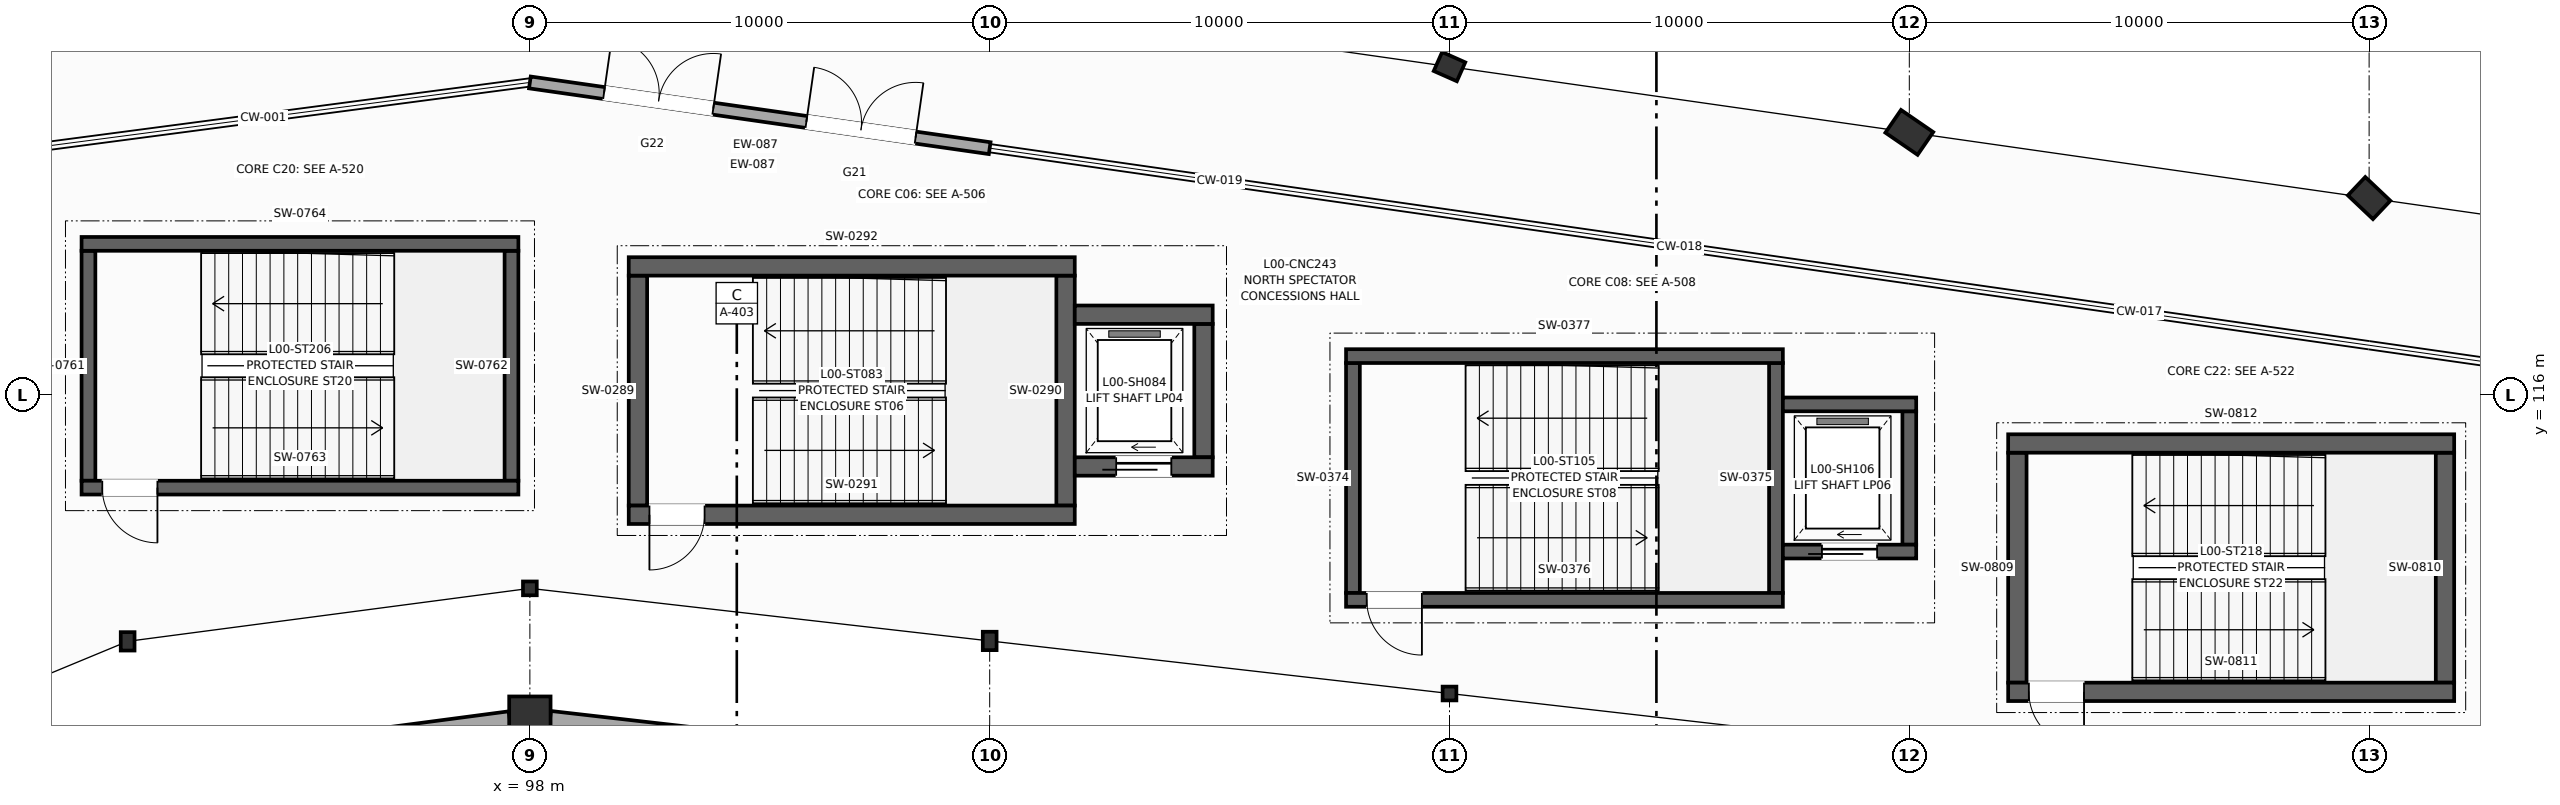
"""IFC4 building model, lengths in metres.
Left out: names, types, materials, properties, quantities, classifications, styles, units other than length and angle.
Written with IfcOpenShell. Run it as: python <this file> out.ifc"""

import sys

from ifc_helpers import new_model, si_unit, direction, frame, frame_2d, origin, origin_2d, place, context, subcontext, project, spatial, rectangle, i_section, extrude, element, fill, save


model = new_model("IFC4")
c1 = context("Model", 3, precision=1e-05, world=origin(), true_north=direction((0.0, 1.0)))
c2 = subcontext(c1, "Body", "Model", "MODEL_VIEW")
j1 = project(units=[si_unit("LENGTHUNIT", "METRE"), si_unit("PLANEANGLEUNIT", "RADIAN")], contexts=[c1])
p1 = place(None, origin())
s1 = spatial("IfcSite", under=j1, at=p1, CompositionType="ELEMENT")
p2 = place(p1, origin())
s2 = spatial("IfcBuilding", under=s1, at=p2, CompositionType="ELEMENT")
p3 = place(p2, origin())
s3 = spatial("IfcBuildingStorey", under=s2, at=p3, CompositionType="ELEMENT", Elevation=0.0)
p4 = place(p3, frame((98.0, 109.0, 0.0), z_axis=(0.0, 0.0, 1.0), x_axis=(0.0, 1.0, 0.0)))
e1 = element("IfcColumn", 1, at=p4, inside=s3, PredefinedType="COLUMN", context=c2, shape_type="SweptSolid", body=[
    extrude(rectangle(XDim=0.9, YDim=0.9, at=origin_2d()), origin(), (0.0, 0.0, 1.0), 4.5),
])
p5 = place(p3, frame((98.0, 111.8, 0.0), z_axis=(0.0, 0.0, 1.0), x_axis=(1.0, 0.0, 0.0)))
e2 = element("IfcColumn", 2, at=p5, inside=s3, PredefinedType="COLUMN", context=c2, shape_type="SweptSolid", body=[
    extrude(i_section(OverallWidth=0.3, OverallDepth=0.3, WebThickness=0.011, FlangeThickness=0.019, at=origin_2d()), origin(), (0.0, 0.0, 1.0), 4.5),
])
p6 = place(p3, frame((89.252, 110.648, 0.0), z_axis=(0.0, 0.0, 1.0), x_axis=(1.0, 0.0, 0.0)))
e3 = element("IfcColumn", 3, at=p6, inside=s3, PredefinedType="COLUMN", context=c2, shape_type="SweptSolid", body=[
    extrude(i_section(OverallWidth=0.3, OverallDepth=0.4, WebThickness=0.013, FlangeThickness=0.024, at=origin_2d()), origin(), (0.0, 0.0, 1.0), 4.5),
])
p7 = place(p3, frame((118.0, 109.514, 0.0), z_axis=(0.0, 0.0, 1.0), x_axis=(1.0, 0.0, 0.0)))
e4 = element("IfcColumn", 4, at=p7, inside=s3, PredefinedType="COLUMN", context=c2, shape_type="SweptSolid", body=[
    extrude(i_section(OverallWidth=0.3, OverallDepth=0.3, WebThickness=0.011, FlangeThickness=0.019, at=origin_2d()), origin(), (0.0, 0.0, 1.0), 4.5),
])
p8 = place(p3, frame((108.0, 110.657, 0.0), z_axis=(0.0, 0.0, 1.0), x_axis=(1.0, 0.0, 0.0)))
e5 = element("IfcColumn", 5, at=p8, inside=s3, PredefinedType="COLUMN", context=c2, shape_type="SweptSolid", body=[
    extrude(i_section(OverallWidth=0.3, OverallDepth=0.4, WebThickness=0.013, FlangeThickness=0.024, at=origin_2d()), origin(), (0.0, 0.0, 1.0), 4.5),
])
p9 = place(p3, frame((138.0, 120.286, 0.0), z_axis=(0.0, 0.0, 1.0), x_axis=(0.687087510804, 0.726574670971, 0.0)))
e6 = element("IfcColumn", 6, at=p9, inside=s3, PredefinedType="PILASTER", context=c2, shape_type="SweptSolid", body=[
    extrude(rectangle(XDim=0.75, YDim=0.55, at=origin_2d()), origin(), (0.0, 0.0, 1.0), 4.5),
])
p10 = place(p3, frame((128.0, 121.714, 0.0), z_axis=(0.0, 0.0, 1.0), x_axis=(0.566406236925, 0.824126188622, 0.0)))
e7 = element("IfcColumn", 7, at=p10, inside=s3, PredefinedType="PILASTER", context=c2, shape_type="SweptSolid", body=[
    extrude(rectangle(XDim=0.85, YDim=0.6, at=origin_2d()), origin(), (0.0, 0.0, 1.0), 4.5),
])
p11 = place(p3, frame((118.0, 123.143, 0.0), z_axis=(0.0, 0.0, 1.0), x_axis=(0.40514158678, 0.914253955234, 0.0)))
e8 = element("IfcColumn", 8, at=p11, inside=s3, PredefinedType="PILASTER", context=c2, shape_type="SweptSolid", body=[
    extrude(rectangle(XDim=0.55, YDim=0.45, at=origin_2d()), origin(), (0.0, 0.0, 1.0), 4.5),
])
p12 = place(p3, frame((108.0, 121.371, 0.0), z_axis=(0.0, 0.0, 1.0), x_axis=(-0.989944175879, 0.141458575718, 0.0)))
e9 = element("IfcWall", 9, at=p12, inside=s3, PredefinedType="SOLIDWALL", context=c2, shape_type="SweptSolid", body=[
    extrude(rectangle(XDim=10.102, YDim=0.26, at=frame_2d((5.051, 0.0))), origin(), (0.0, 0.0, 1.0), 3.68),
])
p13 = place(p12, frame((1.628, 0.0, 0.0)))
e10 = element("IfcOpeningElement", 10, at=p13, cuts=e9, PredefinedType="OPENING", context=c2, shape_type="SweptSolid", body=[
    extrude(rectangle(XDim=2.4, YDim=2.5, at=frame_2d((1.2, 1.25))), frame((0.0, 0.14, 0.0), z_axis=(0.0, -1.0, 0.0), x_axis=(1.0, 0.0, 0.0)), (0.0, 0.0, 1.0), 0.28),
])
p14 = place(p12, frame((6.073, 0.0, 0.0)))
e11 = element("IfcOpeningElement", 11, at=p14, cuts=e9, PredefinedType="OPENING", context=c2, shape_type="SweptSolid", body=[
    extrude(rectangle(XDim=2.4, YDim=2.5, at=frame_2d((1.2, 1.25))), frame((0.0, 0.14, 0.0), z_axis=(0.0, -1.0, 0.0), x_axis=(1.0, 0.0, 0.0)), (0.0, 0.0, 1.0), 0.28),
])
p15 = place(p3, frame((97.564, 108.943, 0.0), z_axis=(0.0, 0.0, 1.0), x_axis=(-0.991432160885, -0.130622625772, 0.0)))
e12 = element("IfcWall", 12, at=p15, inside=s3, PredefinedType="SOLIDWALL", context=c2, shape_type="SweptSolid", body=[
    extrude(rectangle(XDim=7.213, YDim=0.37, at=frame_2d((3.606, 0.0))), origin(), (0.0, 0.0, 1.0), 3.3),
])
p16 = place(p3, frame((107.563, 107.907, 0.0), z_axis=(0.0, 0.0, 1.0), x_axis=(-0.993532672656, 0.113546591161, 0.0)))
e13 = element("IfcWall", 13, at=p16, inside=s3, PredefinedType="SOLIDWALL", context=c2, shape_type="SweptSolid", body=[
    extrude(rectangle(XDim=9.185, YDim=0.37, at=frame_2d((4.593, 0.0))), origin(), (0.0, 0.0, 1.0), 3.3),
])
for number, where, z_axis, x_axis in (
    (14, (100.35, 113.6, 0.0), (0.0, 0.0, 1.0), (0.0, 1.0, 0.0)),
    (15, (109.65, 113.6, 0.0), (0.0, 0.0, 1.0), (0.0, 1.0, 0.0)),
):
    element("IfcWall", number, at=place(p3, frame(where, z_axis=z_axis, x_axis=x_axis)), inside=s3, PredefinedType="SHEAR", context=c2, shape_type="SweptSolid", body=[
        extrude(rectangle(XDim=5.0, YDim=0.4, at=frame_2d((2.5, 0.0))), origin(), (0.0, 0.0, 1.0), 4.225),
    ])
p17 = place(p3, frame((100.15, 113.4, 0.0), z_axis=(0.0, 0.0, 1.0), x_axis=(1.0, 0.0, 0.0)))
e16 = element("IfcWall", 16, at=p17, inside=s3, PredefinedType="SHEAR", context=c2, shape_type="SweptSolid", body=[
    extrude(rectangle(XDim=9.7, YDim=0.4, at=frame_2d((4.85, 0.0))), origin(), (0.0, 0.0, 1.0), 4.225),
])
p18 = place(p17, frame((0.45, 0.0, 0.0)))
e17 = element("IfcOpeningElement", 17, at=p18, cuts=e16, PredefinedType="OPENING", context=c2, shape_type="SweptSolid", body=[
    extrude(rectangle(XDim=1.2, YDim=2.2, at=frame_2d((0.6, 1.1))), frame((0.0, 0.21, 0.0), z_axis=(0.0, -1.0, 0.0), x_axis=(1.0, 0.0, 0.0)), (0.0, 0.0, 1.0), 0.42),
])
p19 = place(p3, frame((100.15, 118.8, 0.0), z_axis=(0.0, 0.0, 1.0), x_axis=(1.0, 0.0, 0.0)))
e18 = element("IfcWall", 18, at=p19, inside=s3, PredefinedType="SHEAR", context=c2, shape_type="SweptSolid", body=[
    extrude(rectangle(XDim=9.7, YDim=0.4, at=frame_2d((4.85, 0.0))), origin(), (0.0, 0.0, 1.0), 4.225),
])
p20 = place(p3, frame((112.65, 114.65, 0.0), z_axis=(0.0, 0.0, 1.0), x_axis=(0.0, 1.0, 0.0)))
e19 = element("IfcWall", 19, at=p20, inside=s3, PredefinedType="SHEAR", context=c2, shape_type="SweptSolid", body=[
    extrude(rectangle(XDim=2.9, YDim=0.4, at=frame_2d((1.45, 0.0))), origin(), (0.0, 0.0, 1.0), 4.225),
])
p21 = place(p3, frame((109.85, 114.45, 0.0), z_axis=(0.0, 0.0, 1.0), x_axis=(1.0, 0.0, 0.0)))
e20 = element("IfcWall", 20, at=p21, inside=s3, PredefinedType="SHEAR", context=c2, shape_type="SweptSolid", body=[
    extrude(rectangle(XDim=3.0, YDim=0.4, at=frame_2d((1.5, 0.0))), origin(), (0.0, 0.0, 1.0), 4.225),
])
p22 = place(p21, frame((0.9, 0.0, 0.0)))
e21 = element("IfcOpeningElement", 21, at=p22, cuts=e20, PredefinedType="OPENING", context=c2, shape_type="SweptSolid", body=[
    extrude(rectangle(XDim=1.2, YDim=2.2, at=frame_2d((0.6, 1.1))), frame((0.0, 0.21, 0.0), z_axis=(0.0, -1.0, 0.0), x_axis=(1.0, 0.0, 0.0)), (0.0, 0.0, 1.0), 0.42),
])
p23 = place(p3, frame((109.85, 117.75, 0.0), z_axis=(0.0, 0.0, 1.0), x_axis=(1.0, 0.0, 0.0)))
e22 = element("IfcWall", 22, at=p23, inside=s3, PredefinedType="SHEAR", context=c2, shape_type="SweptSolid", body=[
    extrude(rectangle(XDim=3.0, YDim=0.4, at=frame_2d((1.5, 0.0))), origin(), (0.0, 0.0, 1.0), 4.225),
])
for number, where, z_axis, x_axis in (
    (23, (115.9, 111.7, 0.0), (0.0, 0.0, 1.0), (0.0, 1.0, 0.0)),
    (24, (125.1, 111.7, 0.0), (0.0, 0.0, 1.0), (0.0, 1.0, 0.0)),
):
    element("IfcWall", number, at=place(p3, frame(where, z_axis=z_axis, x_axis=x_axis)), inside=s3, PredefinedType="SHEAR", context=c2, shape_type="SweptSolid", body=[
        extrude(rectangle(XDim=5.0, YDim=0.3, at=frame_2d((2.5, 0.0))), origin(), (0.0, 0.0, 1.0), 4.225),
    ])
p24 = place(p3, frame((115.75, 111.55, 0.0), z_axis=(0.0, 0.0, 1.0), x_axis=(1.0, 0.0, 0.0)))
e25 = element("IfcWall", 25, at=p24, inside=s3, PredefinedType="SHEAR", context=c2, shape_type="SweptSolid", body=[
    extrude(rectangle(XDim=9.5, YDim=0.3, at=frame_2d((4.75, 0.0))), origin(), (0.0, 0.0, 1.0), 4.225),
])
p25 = place(p24, frame((0.45, 0.0, 0.0)))
e26 = element("IfcOpeningElement", 26, at=p25, cuts=e25, PredefinedType="OPENING", context=c2, shape_type="SweptSolid", body=[
    extrude(rectangle(XDim=1.2, YDim=2.2, at=frame_2d((0.6, 1.1))), frame((0.0, 0.16, 0.0), z_axis=(0.0, -1.0, 0.0), x_axis=(1.0, 0.0, 0.0)), (0.0, 0.0, 1.0), 0.32),
])
p26 = place(p3, frame((115.75, 116.85, 0.0), z_axis=(0.0, 0.0, 1.0), x_axis=(1.0, 0.0, 0.0)))
e27 = element("IfcWall", 27, at=p26, inside=s3, PredefinedType="SHEAR", context=c2, shape_type="SweptSolid", body=[
    extrude(rectangle(XDim=9.5, YDim=0.3, at=frame_2d((4.75, 0.0))), origin(), (0.0, 0.0, 1.0), 4.225),
])
p27 = place(p3, frame((128.0, 112.75, 0.0), z_axis=(0.0, 0.0, 1.0), x_axis=(0.0, 1.0, 0.0)))
e28 = element("IfcWall", 28, at=p27, inside=s3, PredefinedType="SHEAR", context=c2, shape_type="SweptSolid", body=[
    extrude(rectangle(XDim=2.9, YDim=0.3, at=frame_2d((1.45, 0.0))), origin(), (0.0, 0.0, 1.0), 4.225),
])
p28 = place(p3, frame((125.25, 112.6, 0.0), z_axis=(0.0, 0.0, 1.0), x_axis=(1.0, 0.0, 0.0)))
e29 = element("IfcWall", 29, at=p28, inside=s3, PredefinedType="SHEAR", context=c2, shape_type="SweptSolid", body=[
    extrude(rectangle(XDim=2.9, YDim=0.3, at=frame_2d((1.45, 0.0))), origin(), (0.0, 0.0, 1.0), 4.225),
])
p29 = place(p28, frame((0.85, 0.0, 0.0)))
e30 = element("IfcOpeningElement", 30, at=p29, cuts=e29, PredefinedType="OPENING", context=c2, shape_type="SweptSolid", body=[
    extrude(rectangle(XDim=1.2, YDim=2.2, at=frame_2d((0.6, 1.1))), frame((0.0, 0.16, 0.0), z_axis=(0.0, -1.0, 0.0), x_axis=(1.0, 0.0, 0.0)), (0.0, 0.0, 1.0), 0.32),
])
p30 = place(p3, frame((125.25, 115.8, 0.0), z_axis=(0.0, 0.0, 1.0), x_axis=(1.0, 0.0, 0.0)))
e31 = element("IfcWall", 31, at=p30, inside=s3, PredefinedType="SHEAR", context=c2, shape_type="SweptSolid", body=[
    extrude(rectangle(XDim=2.9, YDim=0.3, at=frame_2d((1.45, 0.0))), origin(), (0.0, 0.0, 1.0), 4.225),
])
for number, where, z_axis, x_axis in (
    (32, (88.4, 114.14, 0.0), (0.0, 0.0, 1.0), (0.0, 1.0, 0.0)),
    (33, (97.6, 114.14, 0.0), (0.0, 0.0, 1.0), (0.0, 1.0, 0.0)),
):
    element("IfcWall", number, at=place(p3, frame(where, z_axis=z_axis, x_axis=x_axis)), inside=s3, PredefinedType="SHEAR", context=c2, shape_type="SweptSolid", body=[
        extrude(rectangle(XDim=5.0, YDim=0.3, at=frame_2d((2.5, 0.0))), origin(), (0.0, 0.0, 1.0), 4.225),
    ])
p31 = place(p3, frame((88.25, 113.99, 0.0), z_axis=(0.0, 0.0, 1.0), x_axis=(1.0, 0.0, 0.0)))
e34 = element("IfcWall", 34, at=p31, inside=s3, PredefinedType="SHEAR", context=c2, shape_type="SweptSolid", body=[
    extrude(rectangle(XDim=9.5, YDim=0.3, at=frame_2d((4.75, 0.0))), origin(), (0.0, 0.0, 1.0), 4.225),
])
p32 = place(p31, frame((0.45, 0.0, 0.0)))
e35 = element("IfcOpeningElement", 35, at=p32, cuts=e34, PredefinedType="OPENING", context=c2, shape_type="SweptSolid", body=[
    extrude(rectangle(XDim=1.2, YDim=2.2, at=frame_2d((0.6, 1.1))), frame((0.0, 0.16, 0.0), z_axis=(0.0, -1.0, 0.0), x_axis=(1.0, 0.0, 0.0)), (0.0, 0.0, 1.0), 0.32),
])
p33 = place(p3, frame((88.25, 119.29, 0.0), z_axis=(0.0, 0.0, 1.0), x_axis=(1.0, 0.0, 0.0)))
e36 = element("IfcWall", 36, at=p33, inside=s3, PredefinedType="SHEAR", context=c2, shape_type="SweptSolid", body=[
    extrude(rectangle(XDim=9.5, YDim=0.3, at=frame_2d((4.75, 0.0))), origin(), (0.0, 0.0, 1.0), 4.225),
])
for number, where, z_axis, x_axis in (
    (37, (130.35, 109.75, 0.0), (0.0, 0.0, 1.0), (0.0, 1.0, 0.0)),
    (38, (139.65, 109.75, 0.0), (0.0, 0.0, 1.0), (0.0, 1.0, 0.0)),
):
    element("IfcWall", number, at=place(p3, frame(where, z_axis=z_axis, x_axis=x_axis)), inside=s3, PredefinedType="SHEAR", context=c2, shape_type="SweptSolid", body=[
        extrude(rectangle(XDim=5.0, YDim=0.4, at=frame_2d((2.5, 0.0))), origin(), (0.0, 0.0, 1.0), 4.225),
    ])
p34 = place(p3, frame((130.15, 109.55, 0.0), z_axis=(0.0, 0.0, 1.0), x_axis=(1.0, 0.0, 0.0)))
e39 = element("IfcWall", 39, at=p34, inside=s3, PredefinedType="SHEAR", context=c2, shape_type="SweptSolid", body=[
    extrude(rectangle(XDim=9.7, YDim=0.4, at=frame_2d((4.85, 0.0))), origin(), (0.0, 0.0, 1.0), 4.225),
])
p35 = place(p34, frame((0.45, 0.0, 0.0)))
e40 = element("IfcOpeningElement", 40, at=p35, cuts=e39, PredefinedType="OPENING", context=c2, shape_type="SweptSolid", body=[
    extrude(rectangle(XDim=1.2, YDim=2.2, at=frame_2d((0.6, 1.1))), frame((0.0, 0.21, 0.0), z_axis=(0.0, -1.0, 0.0), x_axis=(1.0, 0.0, 0.0)), (0.0, 0.0, 1.0), 0.42),
])
p36 = place(p3, frame((130.15, 114.95, 0.0), z_axis=(0.0, 0.0, 1.0), x_axis=(1.0, 0.0, 0.0)))
e41 = element("IfcWall", 41, at=p36, inside=s3, PredefinedType="SHEAR", context=c2, shape_type="SweptSolid", body=[
    extrude(rectangle(XDim=9.7, YDim=0.4, at=frame_2d((4.85, 0.0))), origin(), (0.0, 0.0, 1.0), 4.225),
])
p37 = place(p13, frame((2.4, 0.0, 0.0), z_axis=(0.0, 0.0, 1.0), x_axis=(-1.0, 0.0, 0.0)))
e42 = element("IfcDoor", 42, at=p37, inside=s3, OperationType="DOUBLE_DOOR_SINGLE_SWING", PredefinedType="DOOR", context=c2, shape_type="SweptSolid", body=[
    extrude(rectangle(XDim=2.4, YDim=2.5, at=frame_2d((1.2, 1.25))), frame((0.0, 0.025, 0.0), z_axis=(0.0, -1.0, 0.0), x_axis=(1.0, 0.0, 0.0)), (0.0, 0.0, 1.0), 0.05),
])
fill(e10, e42)
p38 = place(p14, frame((2.4, 0.0, 0.0), z_axis=(0.0, 0.0, 1.0), x_axis=(-1.0, 0.0, 0.0)))
e43 = element("IfcDoor", 43, at=p38, inside=s3, OperationType="DOUBLE_DOOR_SINGLE_SWING", PredefinedType="DOOR", context=c2, shape_type="SweptSolid", body=[
    extrude(rectangle(XDim=2.4, YDim=2.5, at=frame_2d((1.2, 1.25))), frame((0.0, 0.025, 0.0), z_axis=(0.0, -1.0, 0.0), x_axis=(1.0, 0.0, 0.0)), (0.0, 0.0, 1.0), 0.05),
])
fill(e11, e43)
p39 = place(p18, frame((1.2, 0.0, 0.0), z_axis=(0.0, 0.0, 1.0), x_axis=(-1.0, 0.0, 0.0)))
e44 = element("IfcDoor", 44, at=p39, inside=s3, OperationType="SINGLE_SWING_LEFT", PredefinedType="DOOR", context=c2, shape_type="SweptSolid", body=[
    extrude(rectangle(XDim=1.2, YDim=2.2, at=frame_2d((0.6, 1.1))), frame((0.0, 0.025, 0.0), z_axis=(0.0, -1.0, 0.0), x_axis=(1.0, 0.0, 0.0)), (0.0, 0.0, 1.0), 0.05),
])
fill(e17, e44)
p40 = place(p22, origin())
e45 = element("IfcDoor", 45, at=p40, inside=s3, OperationType="SLIDING_TO_LEFT", PredefinedType="DOOR", context=c2, shape_type="SweptSolid", body=[
    extrude(rectangle(XDim=1.2, YDim=2.2, at=frame_2d((0.6, 1.1))), frame((0.0, 0.025, 0.0), z_axis=(0.0, -1.0, 0.0), x_axis=(1.0, 0.0, 0.0)), (0.0, 0.0, 1.0), 0.05),
])
fill(e21, e45)
p41 = place(p25, frame((1.2, 0.0, 0.0), z_axis=(0.0, 0.0, 1.0), x_axis=(-1.0, 0.0, 0.0)))
e46 = element("IfcDoor", 46, at=p41, inside=s3, OperationType="SINGLE_SWING_RIGHT", PredefinedType="DOOR", context=c2, shape_type="SweptSolid", body=[
    extrude(rectangle(XDim=1.2, YDim=2.2, at=frame_2d((0.6, 1.1))), frame((0.0, 0.025, 0.0), z_axis=(0.0, -1.0, 0.0), x_axis=(1.0, 0.0, 0.0)), (0.0, 0.0, 1.0), 0.05),
])
fill(e26, e46)
p42 = place(p29, origin())
e47 = element("IfcDoor", 47, at=p42, inside=s3, OperationType="SLIDING_TO_LEFT", PredefinedType="DOOR", context=c2, shape_type="SweptSolid", body=[
    extrude(rectangle(XDim=1.2, YDim=2.2, at=frame_2d((0.6, 1.1))), frame((0.0, 0.025, 0.0), z_axis=(0.0, -1.0, 0.0), x_axis=(1.0, 0.0, 0.0)), (0.0, 0.0, 1.0), 0.05),
])
fill(e30, e47)
p43 = place(p32, frame((1.2, 0.0, 0.0), z_axis=(0.0, 0.0, 1.0), x_axis=(-1.0, 0.0, 0.0)))
e48 = element("IfcDoor", 48, at=p43, inside=s3, OperationType="SINGLE_SWING_RIGHT", PredefinedType="DOOR", context=c2, shape_type="SweptSolid", body=[
    extrude(rectangle(XDim=1.2, YDim=2.2, at=frame_2d((0.6, 1.1))), frame((0.0, 0.025, 0.0), z_axis=(0.0, -1.0, 0.0), x_axis=(1.0, 0.0, 0.0)), (0.0, 0.0, 1.0), 0.05),
])
fill(e35, e48)
p44 = place(p35, frame((1.2, 0.0, 0.0), z_axis=(0.0, 0.0, 1.0), x_axis=(-1.0, 0.0, 0.0)))
e49 = element("IfcDoor", 49, at=p44, inside=s3, OperationType="SINGLE_SWING_RIGHT", PredefinedType="DOOR", context=c2, shape_type="SweptSolid", body=[
    extrude(rectangle(XDim=1.2, YDim=2.2, at=frame_2d((0.6, 1.1))), frame((0.0, 0.025, 0.0), z_axis=(0.0, -1.0, 0.0), x_axis=(1.0, 0.0, 0.0)), (0.0, 0.0, 1.0), 0.05),
])
fill(e40, e49)
save(model, sys.argv[1])
